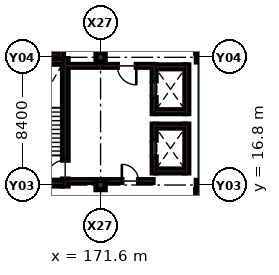
"""IFC4 building model, lengths in metres.
Left out: names, types, materials, properties, quantities, classifications, styles, units other than length and angle.
Written with IfcOpenShell. Run it as: python <this file> out.ifc"""

import sys

from ifc_helpers import new_model, si_unit, direction, frame, frame_2d, origin, origin_2d, place, context, subcontext, project, spatial, rectangle, extrude, element, fill, save


model = new_model("IFC4")
c1 = context("Model", 3, precision=1e-05, world=origin(), true_north=direction((0.0, 1.0)))
c2 = subcontext(c1, "Body", "Model", "MODEL_VIEW")
j1 = project(units=[si_unit("LENGTHUNIT", "METRE"), si_unit("PLANEANGLEUNIT", "RADIAN")], contexts=[c1])
p1 = place(None, origin())
s1 = spatial("IfcSite", under=j1, at=p1, CompositionType="ELEMENT")
p2 = place(p1, origin())
s2 = spatial("IfcBuilding", under=s1, at=p2, CompositionType="ELEMENT")
p3 = place(p2, frame((0.0, 0.0, 39.3)))
s3 = spatial("IfcBuildingStorey", under=s2, at=p3, CompositionType="ELEMENT", Elevation=39.3)
for number, where, z_axis, x_axis in (
    (1, (171.6, 16.8, 0.0), (0.0, 0.0, 1.0), (1.0, 0.0, 0.0)),
    (2, (171.6, 25.2, 0.0), (0.0, 0.0, 1.0), (1.0, 0.0, 0.0)),
    (3, (178.2, 16.8, 0.0), (0.0, 0.0, 1.0), (1.0, 0.0, 0.0)),
    (4, (178.2, 25.2, 0.0), (0.0, 0.0, 1.0), (1.0, 0.0, 0.0)),
):
    element("IfcColumn", number, at=place(p3, frame(where, z_axis=z_axis, x_axis=x_axis)), inside=s3, PredefinedType="COLUMN", context=c2, shape_type="SweptSolid", body=[
        extrude(rectangle(XDim=0.6, YDim=0.6, at=origin_2d()), origin(), (0.0, 0.0, 1.0), 3.9),
    ])
for number, where, z_axis, x_axis in (
    (5, (178.03, 8.695, 0.0), (0.0, 0.0, 1.0), (0.0, 1.0, 0.0)),
    (6, (178.03, 25.495, 0.0), (0.0, 0.0, 1.0), (0.0, 1.0, 0.0)),
):
    element("IfcWall", number, at=place(p3, frame(where, z_axis=z_axis, x_axis=x_axis)), inside=s3, PredefinedType="SHEAR", context=c2, shape_type="SweptSolid", body=[
        extrude(rectangle(XDim=7.81, YDim=0.34, at=frame_2d((3.905, 0.0))), origin(), (0.0, 0.0, 1.0), 3.68),
    ])
p4 = place(p3, frame((169.28, 16.74, 0.0), z_axis=(0.0, 0.0, 1.0), x_axis=(0.0, 1.0, 0.0)))
e7 = element("IfcWall", 7, at=p4, inside=s3, PredefinedType="SHEAR", context=c2, shape_type="SweptSolid", body=[
    extrude(rectangle(XDim=8.37, YDim=0.36, at=frame_2d((4.185, 0.0))), origin(), (0.0, 0.0, 1.0), 3.68),
])
p5 = place(p4, frame((0.45, 0.0, 0.0)))
e8 = element("IfcOpeningElement", 8, at=p5, cuts=e7, PredefinedType="OPENING", context=c2, shape_type="SweptSolid", body=[
    extrude(rectangle(XDim=1.25, YDim=2.15, at=frame_2d((0.625, 1.075))), frame((0.0, 0.19, 0.0), z_axis=(0.0, -1.0, 0.0), x_axis=(1.0, 0.0, 0.0)), (0.0, 0.0, 1.0), 0.38),
])
for number, where, z_axis, x_axis in (
    (9, (165.6, 24.93, 0.0), (0.0, 0.0, 1.0), (1.0, 0.0, 0.0)),
    (10, (165.6, 16.92, 0.0), (0.0, 0.0, 1.0), (1.0, 0.0, 0.0)),
):
    element("IfcWall", number, at=place(p3, frame(where, z_axis=z_axis, x_axis=x_axis)), inside=s3, PredefinedType="SHEAR", context=c2, shape_type="SweptSolid", body=[
        extrude(rectangle(XDim=3.5, YDim=0.36, at=frame_2d((1.75, 0.0))), origin(), (0.0, 0.0, 1.0), 3.68),
    ])
p6 = place(p3, frame((168.98, 25.19, 0.0), z_axis=(0.0, 0.0, 1.0), x_axis=(0.0, 1.0, 0.0)))
e11 = element("IfcWall", 11, at=p6, inside=s3, PredefinedType="SHEAR", context=c2, shape_type="SweptSolid", body=[
    extrude(rectangle(XDim=8.17, YDim=0.36, at=frame_2d((4.085, 0.0))), origin(), (0.0, 0.0, 1.0), 3.68),
])
p7 = place(p6, frame((0.45, 0.0, 0.0)))
e12 = element("IfcOpeningElement", 12, at=p7, cuts=e11, PredefinedType="OPENING", context=c2, shape_type="SweptSolid", body=[
    extrude(rectangle(XDim=1.25, YDim=2.15, at=frame_2d((0.625, 1.075))), frame((0.0, 0.19, 0.0), z_axis=(0.0, -1.0, 0.0), x_axis=(1.0, 0.0, 0.0)), (0.0, 0.0, 1.0), 0.38),
])
p8 = place(p3, frame((165.6, 25.37, 0.0), z_axis=(0.0, 0.0, 1.0), x_axis=(1.0, 0.0, 0.0)))
e13 = element("IfcWall", 13, at=p8, inside=s3, PredefinedType="SHEAR", context=c2, shape_type="SweptSolid", body=[
    extrude(rectangle(XDim=3.2, YDim=0.36, at=frame_2d((1.6, 0.0))), origin(), (0.0, 0.0, 1.0), 3.68),
])
p9 = place(p3, frame((175.125, 17.6, 0.0), z_axis=(0.0, 0.0, 1.0), x_axis=(0.0, 1.0, 0.0)))
e14 = element("IfcWall", 14, at=p9, inside=s3, PredefinedType="SHEAR", context=c2, shape_type="SweptSolid", body=[
    extrude(rectangle(XDim=3.2, YDim=0.25, at=frame_2d((1.6, 0.0))), origin(), (0.0, 0.0, 1.0), 3.68),
])
p10 = place(p9, frame((1.05, 0.0, 0.0)))
e15 = element("IfcOpeningElement", 15, at=p10, cuts=e14, PredefinedType="OPENING", context=c2, shape_type="SweptSolid", body=[
    extrude(rectangle(XDim=1.1, YDim=2.15, at=frame_2d((0.55, 1.075))), frame((0.0, 0.135, 0.0), z_axis=(0.0, -1.0, 0.0), x_axis=(1.0, 0.0, 0.0)), (0.0, 0.0, 1.0), 0.27),
])
p11 = place(p3, frame((177.275, 17.6, 0.0), z_axis=(0.0, 0.0, 1.0), x_axis=(0.0, 1.0, 0.0)))
e16 = element("IfcWall", 16, at=p11, inside=s3, PredefinedType="SHEAR", context=c2, shape_type="SweptSolid", body=[
    extrude(rectangle(XDim=3.2, YDim=0.25, at=frame_2d((1.6, 0.0))), origin(), (0.0, 0.0, 1.0), 3.68),
])
for number, where, z_axis, x_axis in (
    (17, (175.25, 17.725, 0.0), (0.0, 0.0, 1.0), (1.0, 0.0, 0.0)),
    (18, (175.25, 20.675, 0.0), (0.0, 0.0, 1.0), (1.0, 0.0, 0.0)),
):
    element("IfcWall", number, at=place(p3, frame(where, z_axis=z_axis, x_axis=x_axis)), inside=s3, PredefinedType="SHEAR", context=c2, shape_type="SweptSolid", body=[
        extrude(rectangle(XDim=1.9, YDim=0.25, at=frame_2d((0.95, 0.0))), origin(), (0.0, 0.0, 1.0), 3.68),
    ])
p12 = place(p3, frame((175.125, 21.5, 0.0), z_axis=(0.0, 0.0, 1.0), x_axis=(0.0, 1.0, 0.0)))
e19 = element("IfcWall", 19, at=p12, inside=s3, PredefinedType="SHEAR", context=c2, shape_type="SweptSolid", body=[
    extrude(rectangle(XDim=3.2, YDim=0.25, at=frame_2d((1.6, 0.0))), origin(), (0.0, 0.0, 1.0), 3.68),
])
p13 = place(p12, frame((1.05, 0.0, 0.0)))
e20 = element("IfcOpeningElement", 20, at=p13, cuts=e19, PredefinedType="OPENING", context=c2, shape_type="SweptSolid", body=[
    extrude(rectangle(XDim=1.1, YDim=2.15, at=frame_2d((0.55, 1.075))), frame((0.0, 0.135, 0.0), z_axis=(0.0, -1.0, 0.0), x_axis=(1.0, 0.0, 0.0)), (0.0, 0.0, 1.0), 0.27),
])
p14 = place(p3, frame((177.275, 21.5, 0.0), z_axis=(0.0, 0.0, 1.0), x_axis=(0.0, 1.0, 0.0)))
e21 = element("IfcWall", 21, at=p14, inside=s3, PredefinedType="SHEAR", context=c2, shape_type="SweptSolid", body=[
    extrude(rectangle(XDim=3.2, YDim=0.25, at=frame_2d((1.6, 0.0))), origin(), (0.0, 0.0, 1.0), 3.68),
])
for number, where, z_axis, x_axis in (
    (22, (175.25, 21.625, 0.0), (0.0, 0.0, 1.0), (1.0, 0.0, 0.0)),
    (23, (175.25, 24.575, 0.0), (0.0, 0.0, 1.0), (1.0, 0.0, 0.0)),
):
    element("IfcWall", number, at=place(p3, frame(where, z_axis=z_axis, x_axis=x_axis)), inside=s3, PredefinedType="SHEAR", context=c2, shape_type="SweptSolid", body=[
        extrude(rectangle(XDim=1.9, YDim=0.25, at=frame_2d((0.95, 0.0))), origin(), (0.0, 0.0, 1.0), 3.68),
    ])
p15 = place(p3, frame((169.35, 24.64, 0.0), z_axis=(0.0, 0.0, 1.0), x_axis=(1.0, 0.0, 0.0)))
e24 = element("IfcWall", 24, at=p15, inside=s3, PredefinedType="SOLIDWALL", context=c2, shape_type="SweptSolid", body=[
    extrude(rectangle(XDim=5.7, YDim=0.18, at=frame_2d((2.85, 0.0))), origin(), (0.0, 0.0, 1.0), 3.68),
])
p16 = place(p15, frame((3.35, 0.0, 0.0)))
e25 = element("IfcOpeningElement", 25, at=p16, cuts=e24, PredefinedType="OPENING", context=c2, shape_type="SweptSolid", body=[
    extrude(rectangle(XDim=1.25, YDim=2.15, at=frame_2d((0.625, 1.075))), frame((0.0, 0.1, 0.0), z_axis=(0.0, -1.0, 0.0), x_axis=(1.0, 0.0, 0.0)), (0.0, 0.0, 1.0), 0.2),
])
p17 = place(p3, frame((169.35, 17.06, 0.0), z_axis=(0.0, 0.0, 1.0), x_axis=(1.0, 0.0, 0.0)))
e26 = element("IfcWall", 26, at=p17, inside=s3, PredefinedType="SOLIDWALL", context=c2, shape_type="SweptSolid", body=[
    extrude(rectangle(XDim=5.7, YDim=0.18, at=frame_2d((2.85, 0.0))), origin(), (0.0, 0.0, 1.0), 3.015),
])
p18 = place(p17, frame((3.65, 0.0, 0.0)))
e27 = element("IfcOpeningElement", 27, at=p18, cuts=e26, PredefinedType="OPENING", context=c2, shape_type="SweptSolid", body=[
    extrude(rectangle(XDim=1.1, YDim=2.15, at=frame_2d((0.55, 1.075))), frame((0.0, 0.1, 0.0), z_axis=(0.0, -1.0, 0.0), x_axis=(1.0, 0.0, 0.0)), (0.0, 0.0, 1.0), 0.2),
])
p19 = place(p5, origin())
e28 = element("IfcDoor", 28, at=p19, inside=s3, OperationType="SINGLE_SWING_LEFT", PredefinedType="DOOR", context=c2, shape_type="SweptSolid", body=[
    extrude(rectangle(XDim=1.25, YDim=2.15, at=frame_2d((0.625, 1.075))), frame((0.0, 0.025, 0.0), z_axis=(0.0, -1.0, 0.0), x_axis=(1.0, 0.0, 0.0)), (0.0, 0.0, 1.0), 0.05),
])
fill(e8, e28)
p20 = place(p10, origin())
e29 = element("IfcDoor", 29, at=p20, inside=s3, OperationType="SLIDING_TO_LEFT", PredefinedType="DOOR", context=c2, shape_type="SweptSolid", body=[
    extrude(rectangle(XDim=1.1, YDim=2.15, at=frame_2d((0.55, 1.075))), frame((0.0, 0.025, 0.0), z_axis=(0.0, -1.0, 0.0), x_axis=(1.0, 0.0, 0.0)), (0.0, 0.0, 1.0), 0.05),
])
fill(e15, e29)
p21 = place(p13, origin())
e30 = element("IfcDoor", 30, at=p21, inside=s3, OperationType="SLIDING_TO_LEFT", PredefinedType="DOOR", context=c2, shape_type="SweptSolid", body=[
    extrude(rectangle(XDim=1.1, YDim=2.15, at=frame_2d((0.55, 1.075))), frame((0.0, 0.025, 0.0), z_axis=(0.0, -1.0, 0.0), x_axis=(1.0, 0.0, 0.0)), (0.0, 0.0, 1.0), 0.05),
])
fill(e20, e30)
p22 = place(p16, frame((1.25, 0.0, 0.0), z_axis=(0.0, 0.0, 1.0), x_axis=(-1.0, 0.0, 0.0)))
e31 = element("IfcDoor", 31, at=p22, inside=s3, OperationType="SINGLE_SWING_RIGHT", PredefinedType="DOOR", context=c2, shape_type="SweptSolid", body=[
    extrude(rectangle(XDim=1.25, YDim=2.15, at=frame_2d((0.625, 1.075))), frame((0.0, 0.025, 0.0), z_axis=(0.0, -1.0, 0.0), x_axis=(1.0, 0.0, 0.0)), (0.0, 0.0, 1.0), 0.05),
])
fill(e25, e31)
p23 = place(p18, origin())
e32 = element("IfcDoor", 32, at=p23, inside=s3, OperationType="SINGLE_SWING_LEFT", PredefinedType="DOOR", context=c2, shape_type="SweptSolid", body=[
    extrude(rectangle(XDim=1.1, YDim=2.15, at=frame_2d((0.55, 1.075))), frame((0.0, 0.025, 0.0), z_axis=(0.0, -1.0, 0.0), x_axis=(1.0, 0.0, 0.0)), (0.0, 0.0, 1.0), 0.05),
])
fill(e27, e32)
save(model, sys.argv[1])
